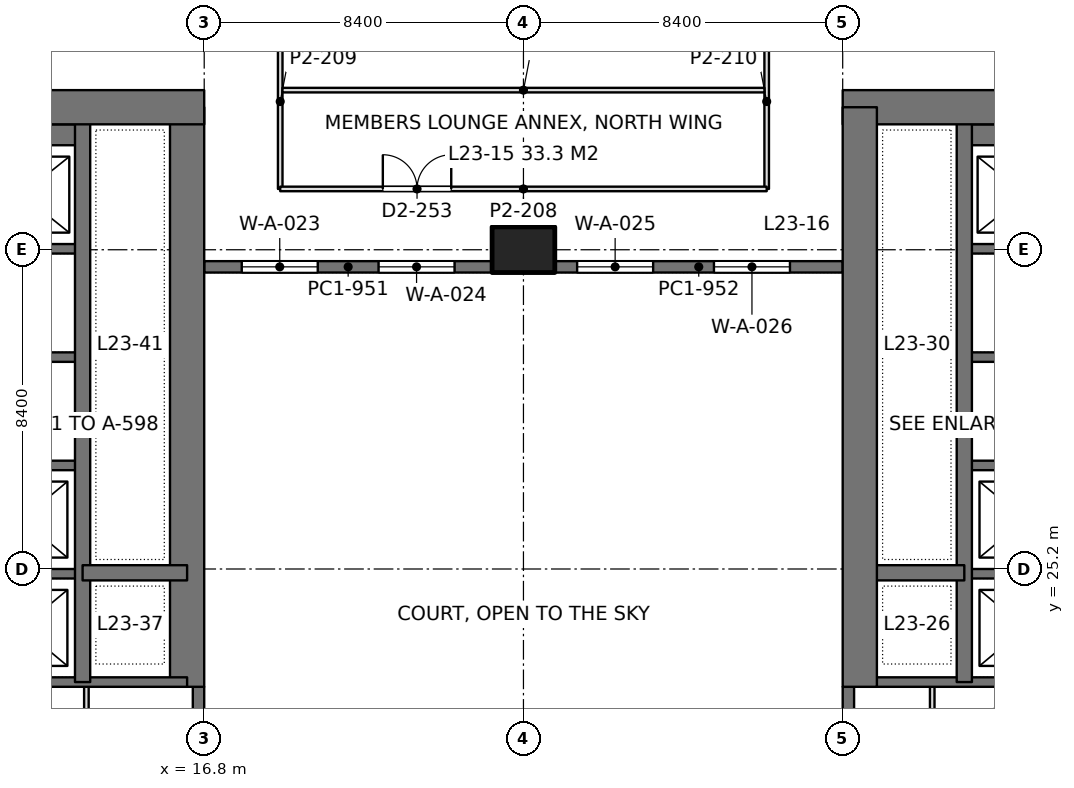
"""IFC4 building model, lengths in metres.
Left out: names, types, materials, properties, quantities, classifications, styles, units other than length and angle.
Written with IfcOpenShell. Run it as: python <this file> out.ifc"""

import sys

from ifc_helpers import new_model, si_unit, direction, frame, frame_2d, origin, origin_2d, place, context, subcontext, project, spatial, rectangle, extrude, element, fill, save


model = new_model("IFC4")
c1 = context("Model", 3, precision=1e-05, world=origin(), true_north=direction((0.0, 1.0)))
c2 = subcontext(c1, "Body", "Model", "MODEL_VIEW")
j1 = project(units=[si_unit("LENGTHUNIT", "METRE"), si_unit("PLANEANGLEUNIT", "RADIAN")], contexts=[c1])
p1 = place(None, origin())
s1 = spatial("IfcSite", under=j1, at=p1, CompositionType="ELEMENT")
p2 = place(p1, origin())
s2 = spatial("IfcBuilding", under=s1, at=p2, CompositionType="ELEMENT")
p3 = place(p2, frame((0.0, 0.0, 105.0)))
s3 = spatial("IfcBuildingStorey", under=s2, at=p3, CompositionType="ELEMENT", Elevation=105.0)
p4 = place(p3, frame((25.2, 33.6, 0.0), z_axis=(0.0, 0.0, 1.0), x_axis=(1.0, 0.0, 0.0)))
e1 = element("IfcColumn", 1, at=p4, inside=s3, PredefinedType="COLUMN", context=c2, shape_type="SweptSolid", body=[
    extrude(rectangle(XDim=1.65, YDim=1.2, at=origin_2d()), origin(), (0.0, 0.0, 1.0), 4.2),
])
p5 = place(p3, frame((-1.2, 37.35, 0.0), z_axis=(0.0, 0.0, 1.0), x_axis=(1.0, 0.0, 0.0)))
e2 = element("IfcWall", 2, at=p5, inside=s3, PredefinedType="SHEAR", context=c2, shape_type="SweptSolid", body=[
    extrude(rectangle(XDim=18.0, YDim=0.9, at=frame_2d((9.0, 0.0))), origin(), (0.0, 0.0, 1.0), 4.2),
])
p6 = place(p5, frame((8.95, 0.0, 0.0)))
e3 = element("IfcOpeningElement", 3, at=p6, cuts=e2, PredefinedType="OPENING", context=c2, shape_type="SweptSolid", body=[
    extrude(rectangle(XDim=1.8, YDim=2.4, at=frame_2d((0.9, 1.2))), frame((0.0, 0.46, 0.0), z_axis=(0.0, -1.0, 0.0), x_axis=(1.0, 0.0, 0.0)), (0.0, 0.0, 1.0), 0.92),
])
p7 = place(p3, frame((16.35, 22.1, 0.0), z_axis=(0.0, 0.0, 1.0), x_axis=(0.0, 1.0, 0.0)))
e4 = element("IfcWall", 4, at=p7, inside=s3, PredefinedType="SHEAR", context=c2, shape_type="SweptSolid", body=[
    extrude(rectangle(XDim=15.25, YDim=0.9, at=frame_2d((7.625, 0.0))), origin(), (0.0, 0.0, 1.0), 4.2),
])
p8 = place(p3, frame((13.6, 22.225, 0.0), z_axis=(0.0, 0.0, 1.0), x_axis=(0.0, 1.0, 0.0)))
e5 = element("IfcWall", 5, at=p8, inside=s3, PredefinedType="SHEAR", context=c2, shape_type="SweptSolid", body=[
    extrude(rectangle(XDim=15.125, YDim=0.4, at=frame_2d((7.562, 0.0))), origin(), (0.0, 0.0, 1.0), 4.2),
])
p9 = place(p3, frame((13.6, 25.1, 0.0), z_axis=(0.0, 0.0, 1.0), x_axis=(1.0, 0.0, 0.0)))
e6 = element("IfcWall", 6, at=p9, inside=s3, PredefinedType="SHEAR", context=c2, shape_type="SweptSolid", body=[
    extrude(rectangle(XDim=2.75, YDim=0.4, at=frame_2d((1.375, 0.0))), origin(), (0.0, 0.0, 1.0), 4.2),
])
p10 = place(p3, frame((10.4, 22.225, 0.0), z_axis=(0.0, 0.0, 1.0), x_axis=(1.0, 0.0, 0.0)))
e7 = element("IfcWall", 7, at=p10, inside=s3, PredefinedType="SHEAR", context=c2, shape_type="SweptSolid", body=[
    extrude(rectangle(XDim=5.95, YDim=0.25, at=frame_2d((2.975, 0.0))), origin(), (0.0, 0.0, 1.0), 4.2),
])
for number, where, z_axis, x_axis in (
    (8, (10.4, 25.075, 0.0), (0.0, 0.0, 1.0), (1.0, 0.0, 0.0)),
    (9, (10.4, 27.925, 0.0), (0.0, 0.0, 1.0), (1.0, 0.0, 0.0)),
    (10, (10.4, 30.775, 0.0), (0.0, 0.0, 1.0), (1.0, 0.0, 0.0)),
    (11, (10.4, 33.625, 0.0), (0.0, 0.0, 1.0), (1.0, 0.0, 0.0)),
):
    element("IfcWall", number, at=place(p3, frame(where, z_axis=z_axis, x_axis=x_axis)), inside=s3, PredefinedType="SHEAR", context=c2, shape_type="SweptSolid", body=[
        extrude(rectangle(XDim=3.2, YDim=0.25, at=frame_2d((1.6, 0.0))), origin(), (0.0, 0.0, 1.0), 4.2),
    ])
p11 = place(p3, frame((10.4, 36.625, 0.0), z_axis=(0.0, 0.0, 1.0), x_axis=(1.0, 0.0, 0.0)))
e12 = element("IfcWall", 12, at=p11, inside=s3, PredefinedType="SHEAR", context=c2, shape_type="SweptSolid", body=[
    extrude(rectangle(XDim=3.2, YDim=0.55, at=frame_2d((1.6, 0.0))), origin(), (0.0, 0.0, 1.0), 4.2),
])
p12 = place(p3, frame((33.6, 37.35, 0.0), z_axis=(0.0, 0.0, 1.0), x_axis=(1.0, 0.0, 0.0)))
e13 = element("IfcWall", 13, at=p12, inside=s3, PredefinedType="SHEAR", context=c2, shape_type="SweptSolid", body=[
    extrude(rectangle(XDim=18.0, YDim=0.9, at=frame_2d((9.0, 0.0))), origin(), (0.0, 0.0, 1.0), 4.2),
])
p13 = place(p12, frame((7.25, 0.0, 0.0)))
e14 = element("IfcOpeningElement", 14, at=p13, cuts=e13, PredefinedType="OPENING", context=c2, shape_type="SweptSolid", body=[
    extrude(rectangle(XDim=1.8, YDim=2.4, at=frame_2d((0.9, 1.2))), frame((0.0, 0.46, 0.0), z_axis=(0.0, -1.0, 0.0), x_axis=(1.0, 0.0, 0.0)), (0.0, 0.0, 1.0), 0.92),
])
p14 = place(p3, frame((34.05, 22.1, 0.0), z_axis=(0.0, 0.0, 1.0), x_axis=(0.0, 1.0, 0.0)))
e15 = element("IfcWall", 15, at=p14, inside=s3, PredefinedType="SHEAR", context=c2, shape_type="SweptSolid", body=[
    extrude(rectangle(XDim=15.25, YDim=0.9, at=frame_2d((7.625, 0.0))), origin(), (0.0, 0.0, 1.0), 4.2),
])
p15 = place(p3, frame((36.8, 22.225, 0.0), z_axis=(0.0, 0.0, 1.0), x_axis=(0.0, 1.0, 0.0)))
e16 = element("IfcWall", 16, at=p15, inside=s3, PredefinedType="SHEAR", context=c2, shape_type="SweptSolid", body=[
    extrude(rectangle(XDim=15.125, YDim=0.4, at=frame_2d((7.562, 0.0))), origin(), (0.0, 0.0, 1.0), 4.2),
])
p16 = place(p3, frame((36.8, 25.1, 0.0), z_axis=(0.0, 0.0, 1.0), x_axis=(-1.0, 0.0, 0.0)))
e17 = element("IfcWall", 17, at=p16, inside=s3, PredefinedType="SHEAR", context=c2, shape_type="SweptSolid", body=[
    extrude(rectangle(XDim=2.75, YDim=0.4, at=frame_2d((1.375, 0.0))), origin(), (0.0, 0.0, 1.0), 4.2),
])
p17 = place(p3, frame((40.0, 22.225, 0.0), z_axis=(0.0, 0.0, 1.0), x_axis=(-1.0, 0.0, 0.0)))
e18 = element("IfcWall", 18, at=p17, inside=s3, PredefinedType="SHEAR", context=c2, shape_type="SweptSolid", body=[
    extrude(rectangle(XDim=5.95, YDim=0.25, at=frame_2d((2.975, 0.0))), origin(), (0.0, 0.0, 1.0), 4.2),
])
for number, where, z_axis, x_axis in (
    (19, (40.0, 25.075, 0.0), (0.0, 0.0, 1.0), (-1.0, 0.0, 0.0)),
    (20, (40.0, 27.925, 0.0), (0.0, 0.0, 1.0), (-1.0, 0.0, 0.0)),
    (21, (40.0, 30.775, 0.0), (0.0, 0.0, 1.0), (-1.0, 0.0, 0.0)),
    (22, (40.0, 33.625, 0.0), (0.0, 0.0, 1.0), (-1.0, 0.0, 0.0)),
):
    element("IfcWall", number, at=place(p3, frame(where, z_axis=z_axis, x_axis=x_axis)), inside=s3, PredefinedType="SHEAR", context=c2, shape_type="SweptSolid", body=[
        extrude(rectangle(XDim=3.2, YDim=0.25, at=frame_2d((1.6, 0.0))), origin(), (0.0, 0.0, 1.0), 4.2),
    ])
p18 = place(p3, frame((40.0, 36.625, 0.0), z_axis=(0.0, 0.0, 1.0), x_axis=(-1.0, 0.0, 0.0)))
e23 = element("IfcWall", 23, at=p18, inside=s3, PredefinedType="SHEAR", context=c2, shape_type="SweptSolid", body=[
    extrude(rectangle(XDim=3.2, YDim=0.55, at=frame_2d((1.6, 0.0))), origin(), (0.0, 0.0, 1.0), 4.2),
])
p19 = place(p3, frame((16.65, 17.1, 0.0), z_axis=(0.0, 0.0, 1.0), x_axis=(0.0, 1.0, 0.0)))
e24 = element("IfcWall", 24, at=p19, inside=s3, PredefinedType="SOLIDWALL", context=c2, shape_type="SweptSolid", body=[
    extrude(rectangle(XDim=5.0, YDim=0.3, at=frame_2d((2.5, 0.0))), origin(), (0.0, 0.0, 1.0), 4.05),
])
p20 = place(p19, frame((1.3, 0.0, 0.1)))
e25 = element("IfcOpeningElement", 25, at=p20, cuts=e24, PredefinedType="OPENING", context=c2, shape_type="SweptSolid", body=[
    extrude(rectangle(XDim=2.0, YDim=3.0, at=frame_2d((1.0, 1.5))), frame((0.0, 0.16, 0.0), z_axis=(0.0, -1.0, 0.0), x_axis=(1.0, 0.0, 0.0)), (0.0, 0.0, 1.0), 0.32),
])
p21 = place(p3, frame((33.75, 17.1, 0.0), z_axis=(0.0, 0.0, 1.0), x_axis=(0.0, 1.0, 0.0)))
e26 = element("IfcWall", 26, at=p21, inside=s3, PredefinedType="SOLIDWALL", context=c2, shape_type="SweptSolid", body=[
    extrude(rectangle(XDim=5.0, YDim=0.3, at=frame_2d((2.5, 0.0))), origin(), (0.0, 0.0, 1.0), 4.05),
])
p22 = place(p21, frame((1.3, 0.0, 0.1)))
e27 = element("IfcOpeningElement", 27, at=p22, cuts=e26, PredefinedType="OPENING", context=c2, shape_type="SweptSolid", body=[
    extrude(rectangle(XDim=2.0, YDim=3.0, at=frame_2d((1.0, 1.5))), frame((0.0, 0.16, 0.0), z_axis=(0.0, -1.0, 0.0), x_axis=(1.0, 0.0, 0.0)), (0.0, 0.0, 1.0), 0.32),
])
p23 = place(p3, frame((16.8, 33.15, 0.0), z_axis=(0.0, 0.0, 1.0), x_axis=(1.0, 0.0, 0.0)))
e28 = element("IfcWall", 28, at=p23, inside=s3, PredefinedType="SOLIDWALL", context=c2, shape_type="SweptSolid", body=[
    extrude(rectangle(XDim=7.575, YDim=0.3, at=frame_2d((3.788, 0.0))), origin(), (0.0, 0.0, 1.0), 4.05),
])
p24 = place(p23, frame((0.988, 0.0, 0.1)))
e29 = element("IfcOpeningElement", 29, at=p24, cuts=e28, PredefinedType="OPENING", context=c2, shape_type="SweptSolid", body=[
    extrude(rectangle(XDim=2.0, YDim=3.0, at=frame_2d((1.0, 1.5))), frame((0.0, 0.16, 0.0), z_axis=(0.0, -1.0, 0.0), x_axis=(1.0, 0.0, 0.0)), (0.0, 0.0, 1.0), 0.32),
])
p25 = place(p23, frame((4.587, 0.0, 0.1)))
e30 = element("IfcOpeningElement", 30, at=p25, cuts=e28, PredefinedType="OPENING", context=c2, shape_type="SweptSolid", body=[
    extrude(rectangle(XDim=2.0, YDim=3.0, at=frame_2d((1.0, 1.5))), frame((0.0, 0.16, 0.0), z_axis=(0.0, -1.0, 0.0), x_axis=(1.0, 0.0, 0.0)), (0.0, 0.0, 1.0), 0.32),
])
p26 = place(p3, frame((26.025, 33.15, 0.0), z_axis=(0.0, 0.0, 1.0), x_axis=(1.0, 0.0, 0.0)))
e31 = element("IfcWall", 31, at=p26, inside=s3, PredefinedType="SOLIDWALL", context=c2, shape_type="SweptSolid", body=[
    extrude(rectangle(XDim=7.575, YDim=0.3, at=frame_2d((3.788, 0.0))), origin(), (0.0, 0.0, 1.0), 4.05),
])
p27 = place(p26, frame((0.587, 0.0, 0.1)))
e32 = element("IfcOpeningElement", 32, at=p27, cuts=e31, PredefinedType="OPENING", context=c2, shape_type="SweptSolid", body=[
    extrude(rectangle(XDim=2.0, YDim=3.0, at=frame_2d((1.0, 1.5))), frame((0.0, 0.16, 0.0), z_axis=(0.0, -1.0, 0.0), x_axis=(1.0, 0.0, 0.0)), (0.0, 0.0, 1.0), 0.32),
])
p28 = place(p26, frame((4.188, 0.0, 0.1)))
e33 = element("IfcOpeningElement", 33, at=p28, cuts=e31, PredefinedType="OPENING", context=c2, shape_type="SweptSolid", body=[
    extrude(rectangle(XDim=2.0, YDim=3.0, at=frame_2d((1.0, 1.5))), frame((0.0, 0.16, 0.0), z_axis=(0.0, -1.0, 0.0), x_axis=(1.0, 0.0, 0.0)), (0.0, 0.0, 1.0), 0.32),
])
for number, where, z_axis, x_axis in (
    (34, (13.7, 17.458, 0.0), (0.0, 0.0, 1.0), (0.0, 1.0, 0.0)),
    (35, (35.956, 17.458, 0.0), (0.0, 0.0, 1.0), (0.0, 1.0, 0.0)),
):
    element("IfcWall", number, at=place(p3, frame(where, z_axis=z_axis, x_axis=x_axis)), inside=s3, PredefinedType="PARTITIONING", context=c2, shape_type="SweptSolid", body=[
        extrude(rectangle(XDim=4.644, YDim=0.12, at=frame_2d((2.322, 0.0))), origin(), (0.0, 0.0, 1.0), 3.6),
    ])
for number, where, z_axis, x_axis in (
    (36, (18.8, 35.2, 0.0), (0.0, 0.0, 1.0), (0.0, 1.0, 0.0)),
    (37, (31.6, 35.2, 0.0), (0.0, 0.0, 1.0), (0.0, 1.0, 0.0)),
):
    element("IfcWall", number, at=place(p3, frame(where, z_axis=z_axis, x_axis=x_axis)), inside=s3, PredefinedType="PARTITIONING", context=c2, shape_type="SweptSolid", body=[
        extrude(rectangle(XDim=4.6, YDim=0.12, at=frame_2d((2.3, 0.0))), origin(), (0.0, 0.0, 1.0), 4.05),
    ])
p29 = place(p3, frame((18.8, 35.2, 0.0), z_axis=(0.0, 0.0, 1.0), x_axis=(1.0, 0.0, 0.0)))
e38 = element("IfcWall", 38, at=p29, inside=s3, PredefinedType="PARTITIONING", context=c2, shape_type="SweptSolid", body=[
    extrude(rectangle(XDim=12.8, YDim=0.12, at=frame_2d((6.4, 0.0))), origin(), (0.0, 0.0, 1.0), 3.55),
])
p30 = place(p29, frame((2.7, 0.0, 0.0)))
e39 = element("IfcOpeningElement", 39, at=p30, cuts=e38, PredefinedType="OPENING", context=c2, shape_type="SweptSolid", body=[
    extrude(rectangle(XDim=1.8, YDim=2.2, at=frame_2d((0.9, 1.1))), frame((0.0, 0.07, 0.0), z_axis=(0.0, -1.0, 0.0), x_axis=(1.0, 0.0, 0.0)), (0.0, 0.0, 1.0), 0.14),
])
p31 = place(p3, frame((18.858, 37.8, 0.0), z_axis=(0.0, 0.0, 1.0), x_axis=(1.0, 0.0, 0.0)))
e40 = element("IfcWall", 40, at=p31, inside=s3, PredefinedType="PARTITIONING", context=c2, shape_type="SweptSolid", body=[
    extrude(rectangle(XDim=12.684, YDim=0.12, at=frame_2d((6.342, 0.0))), origin(), (0.0, 0.0, 1.0), 3.55),
])
p32 = place(p24, origin())
e41 = element("IfcWindow", 41, at=p32, inside=s3, PartitioningType="SINGLE_PANEL", PredefinedType="WINDOW", context=c2, shape_type="SweptSolid", body=[
    extrude(rectangle(XDim=2.0, YDim=3.0, at=frame_2d((1.0, 1.5))), frame((0.0, 0.03, 0.0), z_axis=(0.0, -1.0, 0.0), x_axis=(1.0, 0.0, 0.0)), (0.0, 0.0, 1.0), 0.06),
])
fill(e29, e41)
p33 = place(p25, origin())
e42 = element("IfcWindow", 42, at=p33, inside=s3, PartitioningType="SINGLE_PANEL", PredefinedType="WINDOW", context=c2, shape_type="SweptSolid", body=[
    extrude(rectangle(XDim=2.0, YDim=3.0, at=frame_2d((1.0, 1.5))), frame((0.0, 0.03, 0.0), z_axis=(0.0, -1.0, 0.0), x_axis=(1.0, 0.0, 0.0)), (0.0, 0.0, 1.0), 0.06),
])
fill(e30, e42)
p34 = place(p27, origin())
e43 = element("IfcWindow", 43, at=p34, inside=s3, PartitioningType="SINGLE_PANEL", PredefinedType="WINDOW", context=c2, shape_type="SweptSolid", body=[
    extrude(rectangle(XDim=2.0, YDim=3.0, at=frame_2d((1.0, 1.5))), frame((0.0, 0.03, 0.0), z_axis=(0.0, -1.0, 0.0), x_axis=(1.0, 0.0, 0.0)), (0.0, 0.0, 1.0), 0.06),
])
fill(e32, e43)
p35 = place(p28, origin())
e44 = element("IfcWindow", 44, at=p35, inside=s3, PartitioningType="SINGLE_PANEL", PredefinedType="WINDOW", context=c2, shape_type="SweptSolid", body=[
    extrude(rectangle(XDim=2.0, YDim=3.0, at=frame_2d((1.0, 1.5))), frame((0.0, 0.03, 0.0), z_axis=(0.0, -1.0, 0.0), x_axis=(1.0, 0.0, 0.0)), (0.0, 0.0, 1.0), 0.06),
])
fill(e33, e44)
p36 = place(p30, origin())
e45 = element("IfcDoor", 45, at=p36, inside=s3, OperationType="DOUBLE_DOOR_SINGLE_SWING", PredefinedType="DOOR", context=c2, shape_type="SweptSolid", body=[
    extrude(rectangle(XDim=1.8, YDim=2.2, at=frame_2d((0.9, 1.1))), frame((0.0, 0.025, 0.0), z_axis=(0.0, -1.0, 0.0), x_axis=(1.0, 0.0, 0.0)), (0.0, 0.0, 1.0), 0.05),
])
fill(e39, e45)
save(model, sys.argv[1])
